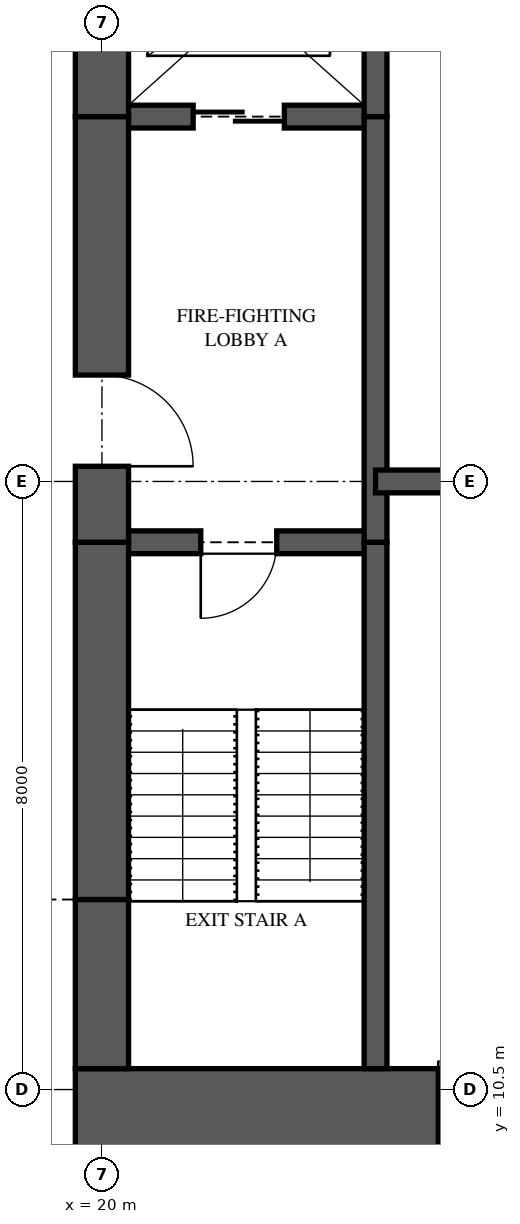
"""IFC4 building model, lengths in metres.
Left out: names, types, materials, properties, quantities, classifications, styles, units other than length and angle.
Written with IfcOpenShell. Run it as: python <this file> out.ifc"""

import sys

from ifc_helpers import new_model, si_unit, direction, frame, frame_2d, origin, place, context, subcontext, project, spatial, rectangle, extrude, element, fill, save


model = new_model("IFC4")
c1 = context("Model", 3, precision=1e-05, world=origin(), true_north=direction((0.0, 1.0)))
c2 = subcontext(c1, "Body", "Model", "MODEL_VIEW")
j1 = project(units=[si_unit("LENGTHUNIT", "METRE"), si_unit("PLANEANGLEUNIT", "RADIAN")], contexts=[c1])
p1 = place(None, origin())
s1 = spatial("IfcSite", under=j1, at=p1, CompositionType="ELEMENT")
p2 = place(p1, origin())
s2 = spatial("IfcBuilding", under=s1, at=p2, CompositionType="ELEMENT")
p3 = place(p2, frame((0.0, 0.0, 171.1)))
s3 = spatial("IfcBuildingStorey", under=s2, at=p3, CompositionType="ELEMENT", Elevation=171.1)
p4 = place(p3, frame((19.65, 10.125, 0.0), z_axis=(0.0, 0.0, 1.0), x_axis=(1.0, 0.0, 0.0)))
e1 = element("IfcWall", 1, at=p4, inside=s3, PredefinedType="SHEAR", context=c2, shape_type="SweptSolid", body=[
    extrude(rectangle(XDim=6.35, YDim=1.3, at=frame_2d((3.175, 0.0))), origin(), (0.0, 0.0, 1.0), 3.35),
])
p5 = place(p4, frame((4.775, 0.0, 0.0)))
e2 = element("IfcOpeningElement", 2, at=p5, cuts=e1, PredefinedType="OPENING", context=c2, shape_type="SweptSolid", body=[
    extrude(rectangle(XDim=0.75, YDim=2.1, at=frame_2d((0.375, 1.05))), frame((0.0, 0.66, 0.0), z_axis=(0.0, -1.0, 0.0), x_axis=(1.0, 0.0, 0.0)), (0.0, 0.0, 1.0), 1.32),
])
p6 = place(p3, frame((20.0, 26.225, 0.0), z_axis=(0.0, 0.0, 1.0), x_axis=(0.0, -1.0, 0.0)))
e3 = element("IfcWall", 3, at=p6, inside=s3, PredefinedType="SHEAR", context=c2, shape_type="SweptSolid", body=[
    extrude(rectangle(XDim=2.925, YDim=0.7, at=frame_2d((1.462, 0.0))), origin(), (0.0, 0.0, 1.0), 3.35),
])
p7 = place(p3, frame((20.0, 23.3, 0.0), z_axis=(0.0, 0.0, 1.0), x_axis=(0.0, -1.0, 0.0)))
e4 = element("IfcWall", 4, at=p7, inside=s3, PredefinedType="SHEAR", context=c2, shape_type="SweptSolid", body=[
    extrude(rectangle(XDim=5.6, YDim=0.7, at=frame_2d((2.8, 0.0))), origin(), (0.0, 0.0, 1.0), 3.35),
])
p8 = place(p7, frame((3.4, 0.0, 0.0)))
e5 = element("IfcOpeningElement", 5, at=p8, cuts=e4, PredefinedType="OPENING", context=c2, shape_type="SweptSolid", body=[
    extrude(rectangle(XDim=1.2, YDim=2.2, at=frame_2d((0.6, 1.1))), frame((0.0, 0.36, 0.0), z_axis=(0.0, -1.0, 0.0), x_axis=(1.0, 0.0, 0.0)), (0.0, 0.0, 1.0), 0.72),
])
p9 = place(p3, frame((20.0, 17.7, 0.0), z_axis=(0.0, 0.0, 1.0), x_axis=(0.0, -1.0, 0.0)))
e6 = element("IfcWall", 6, at=p9, inside=s3, PredefinedType="SHEAR", context=c2, shape_type="SweptSolid", body=[
    extrude(rectangle(XDim=4.7, YDim=0.7, at=frame_2d((2.35, 0.0))), origin(), (0.0, 0.0, 1.0), 3.35),
])
p10 = place(p3, frame((20.0, 13.0, 0.0), z_axis=(0.0, 0.0, 1.0), x_axis=(0.0, -1.0, 0.0)))
e7 = element("IfcWall", 7, at=p10, inside=s3, PredefinedType="SHEAR", context=c2, shape_type="SweptSolid", body=[
    extrude(rectangle(XDim=2.225, YDim=0.7, at=frame_2d((1.113, 0.0))), origin(), (0.0, 0.0, 1.0), 3.35),
])
p11 = place(p3, frame((23.6, 10.775, 0.0), z_axis=(0.0, 0.0, 1.0), x_axis=(0.0, 1.0, 0.0)))
e8 = element("IfcWall", 8, at=p11, inside=s3, PredefinedType="SHEAR", context=c2, shape_type="SweptSolid", body=[
    extrude(rectangle(XDim=6.925, YDim=0.3, at=frame_2d((3.462, 0.0))), origin(), (0.0, 0.0, 1.0), 3.35),
])
p12 = place(p3, frame((23.6, 17.7, 0.0), z_axis=(0.0, 0.0, 1.0), x_axis=(0.0, 1.0, 0.0)))
e9 = element("IfcWall", 9, at=p12, inside=s3, PredefinedType="SHEAR", context=c2, shape_type="SweptSolid", body=[
    extrude(rectangle(XDim=5.6, YDim=0.3, at=frame_2d((2.8, 0.0))), origin(), (0.0, 0.0, 1.0), 3.35),
])
p13 = place(p3, frame((23.6, 23.3, 0.0), z_axis=(0.0, 0.0, 1.0), x_axis=(0.0, 1.0, 0.0)))
e10 = element("IfcWall", 10, at=p13, inside=s3, PredefinedType="SHEAR", context=c2, shape_type="SweptSolid", body=[
    extrude(rectangle(XDim=2.925, YDim=0.3, at=frame_2d((1.462, 0.0))), origin(), (0.0, 0.0, 1.0), 3.35),
])
p14 = place(p3, frame((20.0, 17.7, 0.0), z_axis=(0.0, 0.0, 1.0), x_axis=(1.0, 0.0, 0.0)))
e11 = element("IfcWall", 11, at=p14, inside=s3, PredefinedType="SHEAR", context=c2, shape_type="SweptSolid", body=[
    extrude(rectangle(XDim=3.6, YDim=0.3, at=frame_2d((1.8, 0.0))), origin(), (0.0, 0.0, 1.0), 3.35),
])
p15 = place(p14, frame((1.3, 0.0, 0.0)))
e12 = element("IfcOpeningElement", 12, at=p15, cuts=e11, PredefinedType="OPENING", context=c2, shape_type="SweptSolid", body=[
    extrude(rectangle(XDim=1.0, YDim=2.1, at=frame_2d((0.5, 1.05))), frame((0.0, 0.16, 0.0), z_axis=(0.0, -1.0, 0.0), x_axis=(1.0, 0.0, 0.0)), (0.0, 0.0, 1.0), 0.32),
])
p16 = place(p3, frame((20.0, 23.3, 0.0), z_axis=(0.0, 0.0, 1.0), x_axis=(1.0, 0.0, 0.0)))
e13 = element("IfcWall", 13, at=p16, inside=s3, PredefinedType="SHEAR", context=c2, shape_type="SweptSolid", body=[
    extrude(rectangle(XDim=3.6, YDim=0.3, at=frame_2d((1.8, 0.0))), origin(), (0.0, 0.0, 1.0), 3.35),
])
p17 = place(p16, frame((1.2, 0.0, 0.0)))
e14 = element("IfcOpeningElement", 14, at=p17, cuts=e13, PredefinedType="OPENING", context=c2, shape_type="SweptSolid", body=[
    extrude(rectangle(XDim=1.2, YDim=2.1, at=frame_2d((0.6, 1.05))), frame((0.0, 0.16, 0.0), z_axis=(0.0, -1.0, 0.0), x_axis=(1.0, 0.0, 0.0)), (0.0, 0.0, 1.0), 0.32),
])
p18 = place(p3, frame((23.6, 18.5, 0.0), z_axis=(0.0, 0.0, 1.0), x_axis=(1.0, 0.0, 0.0)))
e15 = element("IfcWall", 15, at=p18, inside=s3, PredefinedType="SHEAR", context=c2, shape_type="SweptSolid", body=[
    extrude(rectangle(XDim=2.4, YDim=0.3, at=frame_2d((1.2, 0.0))), origin(), (0.0, 0.0, 1.0), 3.35),
])
p19 = place(p15, frame((1.0, 0.0, 0.0), z_axis=(0.0, 0.0, 1.0), x_axis=(-1.0, 0.0, 0.0)))
e16 = element("IfcDoor", 16, at=p19, inside=s3, OperationType="SINGLE_SWING_RIGHT", PredefinedType="DOOR", context=c2, shape_type="SweptSolid", body=[
    extrude(rectangle(XDim=1.0, YDim=2.1, at=frame_2d((0.5, 1.05))), frame((0.0, 0.025, 0.0), z_axis=(0.0, -1.0, 0.0), x_axis=(1.0, 0.0, 0.0)), (0.0, 0.0, 1.0), 0.05),
])
fill(e12, e16)
p20 = place(p8, origin())
e17 = element("IfcDoor", 17, at=p20, inside=s3, OperationType="SINGLE_SWING_RIGHT", PredefinedType="DOOR", context=c2, shape_type="SweptSolid", body=[
    extrude(rectangle(XDim=1.2, YDim=2.2, at=frame_2d((0.6, 1.1))), frame((0.0, 0.025, 0.0), z_axis=(0.0, -1.0, 0.0), x_axis=(1.0, 0.0, 0.0)), (0.0, 0.0, 1.0), 0.05),
])
fill(e5, e17)
p21 = place(p17, origin())
e18 = element("IfcDoor", 18, at=p21, inside=s3, OperationType="SLIDING_TO_LEFT", PredefinedType="DOOR", context=c2, shape_type="SweptSolid", body=[
    extrude(rectangle(XDim=1.2, YDim=2.1, at=frame_2d((0.6, 1.05))), frame((0.0, 0.025, 0.0), z_axis=(0.0, -1.0, 0.0), x_axis=(1.0, 0.0, 0.0)), (0.0, 0.0, 1.0), 0.05),
])
fill(e14, e18)
p22 = place(p5, origin())
e19 = element("IfcDoor", 19, at=p22, inside=s3, OperationType="SINGLE_SWING_LEFT", PredefinedType="DOOR", context=c2, shape_type="SweptSolid", body=[
    extrude(rectangle(XDim=0.75, YDim=2.1, at=frame_2d((0.375, 1.05))), frame((0.0, 0.025, 0.0), z_axis=(0.0, -1.0, 0.0), x_axis=(1.0, 0.0, 0.0)), (0.0, 0.0, 1.0), 0.05),
])
fill(e2, e19)
save(model, sys.argv[1])
